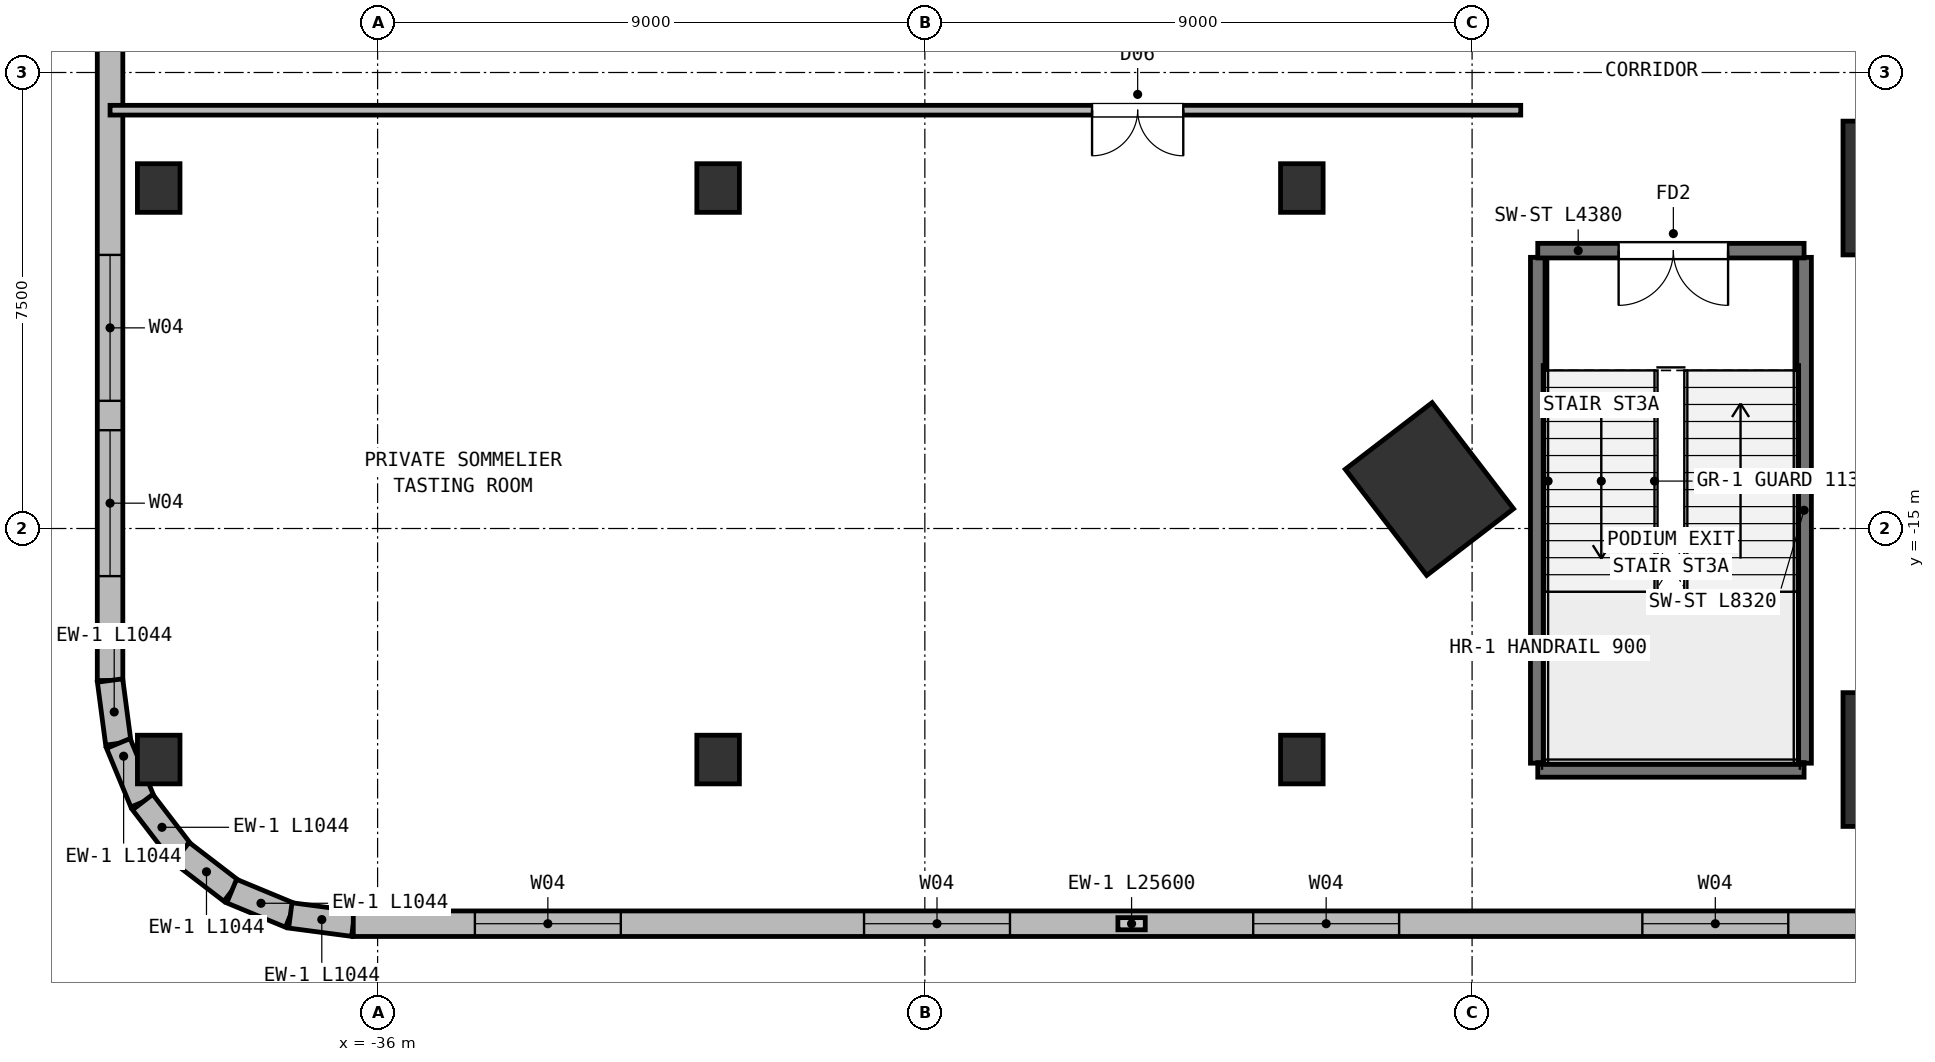
"""IFC4 building model, lengths in metres.
Left out: names, types, materials, properties, quantities, classifications, styles, units other than length and angle.
Written with IfcOpenShell. Run it as: python <this file> out.ifc"""

import sys

from ifc_helpers import new_model, si_unit, direction, frame, frame_2d, origin, origin_2d, place, context, subcontext, project, spatial, rectangle, extrude, element, fill, save


model = new_model("IFC4")
c1 = context("Model", 3, precision=1e-05, world=origin(), true_north=direction((0.0, 1.0)))
c2 = subcontext(c1, "Body", "Model", "MODEL_VIEW")
j1 = project(units=[si_unit("LENGTHUNIT", "METRE"), si_unit("PLANEANGLEUNIT", "RADIAN")], contexts=[c1])
p1 = place(None, origin())
s1 = spatial("IfcSite", under=j1, at=p1, CompositionType="ELEMENT")
p2 = place(p1, origin())
s2 = spatial("IfcBuilding", under=s1, at=p2, CompositionType="ELEMENT")
p3 = place(p2, frame((0.0, 0.0, 11.0)))
s3 = spatial("IfcBuildingStorey", under=s2, at=p3, CompositionType="ELEMENT", Elevation=11.0)
p4 = place(p3, frame((-18.702, -14.351, 0.0), z_axis=(0.0, 0.0, 1.0), x_axis=(0.793353340291, 0.608761429009, 0.0)))
e1 = element("IfcColumn", 1, at=p4, inside=s3, PredefinedType="COLUMN", context=c2, shape_type="SweptSolid", body=[
    extrude(rectangle(XDim=1.8, YDim=2.2, at=origin_2d()), origin(), (0.0, 0.0, 1.0), 5.0),
])
for number, where, z_axis, x_axis in (
    (2, (-39.6, -18.8, 0.0), (0.0, 0.0, 1.0), (1.0, 0.0, 0.0)),
    (3, (-39.6, -9.4, 0.0), (0.0, 0.0, 1.0), (1.0, 0.0, 0.0)),
    (4, (-30.4, -18.8, 0.0), (0.0, 0.0, 1.0), (1.0, 0.0, 0.0)),
    (5, (-30.4, -9.4, 0.0), (0.0, 0.0, 1.0), (1.0, 0.0, 0.0)),
    (6, (-20.8, -18.8, 0.0), (0.0, 0.0, 1.0), (1.0, 0.0, 0.0)),
    (7, (-20.8, -9.4, 0.0), (0.0, 0.0, 1.0), (1.0, 0.0, 0.0)),
):
    element("IfcColumn", number, at=place(p3, frame(where, z_axis=z_axis, x_axis=x_axis)), inside=s3, PredefinedType="COLUMN", context=c2, shape_type="SweptSolid", body=[
        extrude(rectangle(XDim=0.7, YDim=0.8, at=origin_2d()), origin(), (0.0, 0.0, 1.0), 5.0),
    ])
for number, where, z_axis, x_axis in (
    (8, (-11.0, -18.8, 0.0), (0.0, 0.0, 1.0), (1.0, 0.0, 0.0)),
    (9, (-11.0, -9.4, 0.0), (0.0, 0.0, 1.0), (1.0, 0.0, 0.0)),
):
    element("IfcColumn", number, at=place(p3, frame(where, z_axis=z_axis, x_axis=x_axis)), inside=s3, PredefinedType="COLUMN", context=c2, shape_type="SweptSolid", body=[
        extrude(rectangle(XDim=1.8, YDim=2.2, at=origin_2d()), origin(), (0.0, 0.0, 1.0), 5.0),
    ])
p5 = place(p3, frame((-40.4, -17.5, 0.0), z_axis=(0.0, 0.0, 1.0), x_axis=(0.0, 1.0, 0.0)))
e10 = element("IfcWall", 10, at=p5, inside=s3, PredefinedType="SOLIDWALL", context=c2, shape_type="SweptSolid", body=[
    extrude(rectangle(XDim=35.0, YDim=0.42, at=frame_2d((17.5, 0.0))), origin(), (0.0, 0.0, 1.0), 4.66),
])
p6 = place(p5, frame((1.717, 0.0, 0.95)))
e11 = element("IfcOpeningElement", 11, at=p6, cuts=e10, PredefinedType="OPENING", context=c2, shape_type="SweptSolid", body=[
    extrude(rectangle(XDim=2.4, YDim=2.6, at=frame_2d((1.2, 1.3))), frame((0.0, 0.22, 0.0), z_axis=(0.0, -1.0, 0.0), x_axis=(1.0, 0.0, 0.0)), (0.0, 0.0, 1.0), 0.44),
])
p7 = place(p5, frame((4.6, 0.0, 0.95)))
e12 = element("IfcOpeningElement", 12, at=p7, cuts=e10, PredefinedType="OPENING", context=c2, shape_type="SweptSolid", body=[
    extrude(rectangle(XDim=2.4, YDim=2.6, at=frame_2d((1.2, 1.3))), frame((0.0, 0.22, 0.0), z_axis=(0.0, -1.0, 0.0), x_axis=(1.0, 0.0, 0.0)), (0.0, 0.0, 1.0), 0.44),
])
p8 = place(p5, frame((13.383, 0.0, 0.95)))
e13 = element("IfcOpeningElement", 13, at=p8, cuts=e10, PredefinedType="OPENING", context=c2, shape_type="SweptSolid", body=[
    extrude(rectangle(XDim=2.4, YDim=2.6, at=frame_2d((1.2, 1.3))), frame((0.0, 0.22, 0.0), z_axis=(0.0, -1.0, 0.0), x_axis=(1.0, 0.0, 0.0)), (0.0, 0.0, 1.0), 0.44),
])
p9 = place(p5, frame((19.217, 0.0, 0.95)))
e14 = element("IfcOpeningElement", 14, at=p9, cuts=e10, PredefinedType="OPENING", context=c2, shape_type="SweptSolid", body=[
    extrude(rectangle(XDim=2.4, YDim=2.6, at=frame_2d((1.2, 1.3))), frame((0.0, 0.22, 0.0), z_axis=(0.0, -1.0, 0.0), x_axis=(1.0, 0.0, 0.0)), (0.0, 0.0, 1.0), 0.44),
])
p10 = place(p5, frame((28.0, 0.0, 0.95)))
e15 = element("IfcOpeningElement", 15, at=p10, cuts=e10, PredefinedType="OPENING", context=c2, shape_type="SweptSolid", body=[
    extrude(rectangle(XDim=2.4, YDim=2.6, at=frame_2d((1.2, 1.3))), frame((0.0, 0.22, 0.0), z_axis=(0.0, -1.0, 0.0), x_axis=(1.0, 0.0, 0.0)), (0.0, 0.0, 1.0), 0.44),
])
p11 = place(p5, frame((30.883, 0.0, 0.95)))
e16 = element("IfcOpeningElement", 16, at=p11, cuts=e10, PredefinedType="OPENING", context=c2, shape_type="SweptSolid", body=[
    extrude(rectangle(XDim=2.4, YDim=2.6, at=frame_2d((1.2, 1.3))), frame((0.0, 0.22, 0.0), z_axis=(0.0, -1.0, 0.0), x_axis=(1.0, 0.0, 0.0)), (0.0, 0.0, 1.0), 0.44),
])
p12 = place(p3, frame((-40.264, -18.535, 0.0), z_axis=(0.0, 0.0, 1.0), x_axis=(-0.130448465198, 0.991455091231, 0.0)))
e17 = element("IfcWall", 17, at=p12, inside=s3, PredefinedType="SOLIDWALL", context=c2, shape_type="SweptSolid", body=[
    extrude(rectangle(XDim=1.044, YDim=0.42, at=frame_2d((0.522, 0.0))), origin(), (0.0, 0.0, 1.0), 4.66),
])
p13 = place(p3, frame((-39.864, -19.5, 0.0), z_axis=(0.0, 0.0, 1.0), x_axis=(-0.382771688877, 0.923842970528, 0.0)))
e18 = element("IfcWall", 18, at=p13, inside=s3, PredefinedType="SOLIDWALL", context=c2, shape_type="SweptSolid", body=[
    extrude(rectangle(XDim=1.044, YDim=0.42, at=frame_2d((0.522, 0.0))), origin(), (0.0, 0.0, 1.0), 4.66),
])
p14 = place(p3, frame((-39.229, -20.328, 0.0), z_axis=(0.0, 0.0, 1.0), x_axis=(-0.608681879412, 0.793414374508, 0.0)))
e19 = element("IfcWall", 19, at=p14, inside=s3, PredefinedType="SOLIDWALL", context=c2, shape_type="SweptSolid", body=[
    extrude(rectangle(XDim=1.044, YDim=0.42, at=frame_2d((0.522, 0.0))), origin(), (0.0, 0.0, 1.0), 4.66),
])
p15 = place(p3, frame((-38.4, -20.964, 0.0), z_axis=(0.0, 0.0, 1.0), x_axis=(-0.793388088797, 0.608716141198, 0.0)))
e20 = element("IfcWall", 20, at=p15, inside=s3, PredefinedType="SOLIDWALL", context=c2, shape_type="SweptSolid", body=[
    extrude(rectangle(XDim=1.044, YDim=0.42, at=frame_2d((0.522, 0.0))), origin(), (0.0, 0.0, 1.0), 4.66),
])
p16 = place(p3, frame((-37.435, -21.364, 0.0), z_axis=(0.0, 0.0, 1.0), x_axis=(-0.923842970528, 0.382771688877, 0.0)))
e21 = element("IfcWall", 21, at=p16, inside=s3, PredefinedType="SOLIDWALL", context=c2, shape_type="SweptSolid", body=[
    extrude(rectangle(XDim=1.044, YDim=0.42, at=frame_2d((0.522, 0.0))), origin(), (0.0, 0.0, 1.0), 4.66),
])
p17 = place(p3, frame((-36.4, -21.5, 0.0), z_axis=(0.0, 0.0, 1.0), x_axis=(-0.991455091231, 0.130448465198, 0.0)))
e22 = element("IfcWall", 22, at=p17, inside=s3, PredefinedType="SOLIDWALL", context=c2, shape_type="SweptSolid", body=[
    extrude(rectangle(XDim=1.044, YDim=0.42, at=frame_2d((0.522, 0.0))), origin(), (0.0, 0.0, 1.0), 4.66),
])
p18 = place(p3, frame((-10.8, -21.5, 0.0), z_axis=(0.0, 0.0, 1.0), x_axis=(-1.0, 0.0, 0.0)))
e23 = element("IfcWall", 23, at=p18, inside=s3, PredefinedType="SOLIDWALL", context=c2, shape_type="SweptSolid", body=[
    extrude(rectangle(XDim=25.6, YDim=0.42, at=frame_2d((12.8, 0.0))), origin(), (0.0, 0.0, 1.0), 4.66),
])
p19 = place(p18, frame((2.0, 0.0, 0.95)))
e24 = element("IfcOpeningElement", 24, at=p19, cuts=e23, PredefinedType="OPENING", context=c2, shape_type="SweptSolid", body=[
    extrude(rectangle(XDim=2.4, YDim=2.6, at=frame_2d((1.2, 1.3))), frame((0.0, 0.22, 0.0), z_axis=(0.0, -1.0, 0.0), x_axis=(1.0, 0.0, 0.0)), (0.0, 0.0, 1.0), 0.44),
])
p20 = place(p18, frame((8.4, 0.0, 0.95)))
e25 = element("IfcOpeningElement", 25, at=p20, cuts=e23, PredefinedType="OPENING", context=c2, shape_type="SweptSolid", body=[
    extrude(rectangle(XDim=2.4, YDim=2.6, at=frame_2d((1.2, 1.3))), frame((0.0, 0.22, 0.0), z_axis=(0.0, -1.0, 0.0), x_axis=(1.0, 0.0, 0.0)), (0.0, 0.0, 1.0), 0.44),
])
p21 = place(p18, frame((14.8, 0.0, 0.95)))
e26 = element("IfcOpeningElement", 26, at=p21, cuts=e23, PredefinedType="OPENING", context=c2, shape_type="SweptSolid", body=[
    extrude(rectangle(XDim=2.4, YDim=2.6, at=frame_2d((1.2, 1.3))), frame((0.0, 0.22, 0.0), z_axis=(0.0, -1.0, 0.0), x_axis=(1.0, 0.0, 0.0)), (0.0, 0.0, 1.0), 0.44),
])
p22 = place(p18, frame((21.2, 0.0, 0.95)))
e27 = element("IfcOpeningElement", 27, at=p22, cuts=e23, PredefinedType="OPENING", context=c2, shape_type="SweptSolid", body=[
    extrude(rectangle(XDim=2.4, YDim=2.6, at=frame_2d((1.2, 1.3))), frame((0.0, 0.22, 0.0), z_axis=(0.0, -1.0, 0.0), x_axis=(1.0, 0.0, 0.0)), (0.0, 0.0, 1.0), 0.44),
])
for number, where, z_axis, x_axis in (
    (28, (-16.92, -18.86, 0.0), (0.0, 0.0, 1.0), (0.0, 1.0, 0.0)),
    (29, (-12.54, -18.86, 0.0), (0.0, 0.0, 1.0), (0.0, 1.0, 0.0)),
):
    element("IfcWall", number, at=place(p3, frame(where, z_axis=z_axis, x_axis=x_axis)), inside=s3, PredefinedType="SHEAR", context=c2, shape_type="SweptSolid", body=[
        extrude(rectangle(XDim=8.32, YDim=0.24, at=frame_2d((4.16, 0.0))), origin(), (0.0, 0.0, 1.0), 4.66),
    ])
p23 = place(p3, frame((-16.92, -18.97, 0.0), z_axis=(0.0, 0.0, 1.0), x_axis=(1.0, 0.0, 0.0)))
e30 = element("IfcWall", 30, at=p23, inside=s3, PredefinedType="SHEAR", context=c2, shape_type="SweptSolid", body=[
    extrude(rectangle(XDim=4.38, YDim=0.24, at=frame_2d((2.19, 0.0))), origin(), (0.0, 0.0, 1.0), 4.66),
])
p24 = place(p3, frame((-12.54, -10.43, 0.0), z_axis=(0.0, 0.0, 1.0), x_axis=(-1.0, 0.0, 0.0)))
e31 = element("IfcWall", 31, at=p24, inside=s3, PredefinedType="SHEAR", context=c2, shape_type="SweptSolid", body=[
    extrude(rectangle(XDim=4.38, YDim=0.24, at=frame_2d((2.19, 0.0))), origin(), (0.0, 0.0, 1.0), 4.66),
])
p25 = place(p24, frame((1.25, 0.0, 0.0)))
e32 = element("IfcOpeningElement", 32, at=p25, cuts=e31, PredefinedType="OPENING", context=c2, shape_type="SweptSolid", body=[
    extrude(rectangle(XDim=1.8, YDim=2.2, at=frame_2d((0.9, 1.1))), frame((0.0, 0.13, 0.0), z_axis=(0.0, -1.0, 0.0), x_axis=(1.0, 0.0, 0.0)), (0.0, 0.0, 1.0), 0.26),
])
p26 = place(p3, frame((-17.2, -8.12, 0.0), z_axis=(0.0, 0.0, 1.0), x_axis=(-1.0, 0.0, 0.0)))
e33 = element("IfcWall", 33, at=p26, inside=s3, PredefinedType="PARTITIONING", context=c2, shape_type="SweptSolid", body=[
    extrude(rectangle(XDim=23.2, YDim=0.16, at=frame_2d((11.6, 0.0))), origin(), (0.0, 0.0, 1.0), 4.66),
])
p27 = place(p26, frame((5.55, 0.0, 0.0)))
e34 = element("IfcOpeningElement", 34, at=p27, cuts=e33, PredefinedType="OPENING", context=c2, shape_type="SweptSolid", body=[
    extrude(rectangle(XDim=1.5, YDim=2.2, at=frame_2d((0.75, 1.1))), frame((0.0, 0.09, 0.0), z_axis=(0.0, -1.0, 0.0), x_axis=(1.0, 0.0, 0.0)), (0.0, 0.0, 1.0), 0.18),
])
p28 = place(p6, origin())
e35 = element("IfcWindow", 35, at=p28, inside=s3, PartitioningType="SINGLE_PANEL", PredefinedType="WINDOW", context=c2, shape_type="SweptSolid", body=[
    extrude(rectangle(XDim=2.4, YDim=2.6, at=frame_2d((1.2, 1.3))), frame((0.0, 0.03, 0.0), z_axis=(0.0, -1.0, 0.0), x_axis=(1.0, 0.0, 0.0)), (0.0, 0.0, 1.0), 0.06),
])
fill(e11, e35)
p29 = place(p7, origin())
e36 = element("IfcWindow", 36, at=p29, inside=s3, PartitioningType="SINGLE_PANEL", PredefinedType="WINDOW", context=c2, shape_type="SweptSolid", body=[
    extrude(rectangle(XDim=2.4, YDim=2.6, at=frame_2d((1.2, 1.3))), frame((0.0, 0.03, 0.0), z_axis=(0.0, -1.0, 0.0), x_axis=(1.0, 0.0, 0.0)), (0.0, 0.0, 1.0), 0.06),
])
fill(e12, e36)
p30 = place(p19, origin())
e37 = element("IfcWindow", 37, at=p30, inside=s3, PartitioningType="SINGLE_PANEL", PredefinedType="WINDOW", context=c2, shape_type="SweptSolid", body=[
    extrude(rectangle(XDim=2.4, YDim=2.6, at=frame_2d((1.2, 1.3))), frame((0.0, 0.03, 0.0), z_axis=(0.0, -1.0, 0.0), x_axis=(1.0, 0.0, 0.0)), (0.0, 0.0, 1.0), 0.06),
])
fill(e24, e37)
p31 = place(p20, origin())
e38 = element("IfcWindow", 38, at=p31, inside=s3, PartitioningType="SINGLE_PANEL", PredefinedType="WINDOW", context=c2, shape_type="SweptSolid", body=[
    extrude(rectangle(XDim=2.4, YDim=2.6, at=frame_2d((1.2, 1.3))), frame((0.0, 0.03, 0.0), z_axis=(0.0, -1.0, 0.0), x_axis=(1.0, 0.0, 0.0)), (0.0, 0.0, 1.0), 0.06),
])
fill(e25, e38)
p32 = place(p21, origin())
e39 = element("IfcWindow", 39, at=p32, inside=s3, PartitioningType="SINGLE_PANEL", PredefinedType="WINDOW", context=c2, shape_type="SweptSolid", body=[
    extrude(rectangle(XDim=2.4, YDim=2.6, at=frame_2d((1.2, 1.3))), frame((0.0, 0.03, 0.0), z_axis=(0.0, -1.0, 0.0), x_axis=(1.0, 0.0, 0.0)), (0.0, 0.0, 1.0), 0.06),
])
fill(e26, e39)
p33 = place(p22, origin())
e40 = element("IfcWindow", 40, at=p33, inside=s3, PartitioningType="SINGLE_PANEL", PredefinedType="WINDOW", context=c2, shape_type="SweptSolid", body=[
    extrude(rectangle(XDim=2.4, YDim=2.6, at=frame_2d((1.2, 1.3))), frame((0.0, 0.03, 0.0), z_axis=(0.0, -1.0, 0.0), x_axis=(1.0, 0.0, 0.0)), (0.0, 0.0, 1.0), 0.06),
])
fill(e27, e40)
p34 = place(p25, origin())
e41 = element("IfcDoor", 41, at=p34, inside=s3, OperationType="DOUBLE_DOOR_SINGLE_SWING", PredefinedType="DOOR", context=c2, shape_type="SweptSolid", body=[
    extrude(rectangle(XDim=1.8, YDim=2.2, at=frame_2d((0.9, 1.1))), frame((0.0, 0.025, 0.0), z_axis=(0.0, -1.0, 0.0), x_axis=(1.0, 0.0, 0.0)), (0.0, 0.0, 1.0), 0.05),
])
fill(e32, e41)
p35 = place(p27, origin())
e42 = element("IfcDoor", 42, at=p35, inside=s3, OperationType="DOUBLE_DOOR_SINGLE_SWING", PredefinedType="DOOR", context=c2, shape_type="SweptSolid", body=[
    extrude(rectangle(XDim=1.5, YDim=2.2, at=frame_2d((0.75, 1.1))), frame((0.0, 0.025, 0.0), z_axis=(0.0, -1.0, 0.0), x_axis=(1.0, 0.0, 0.0)), (0.0, 0.0, 1.0), 0.05),
])
fill(e34, e42)
save(model, sys.argv[1])
